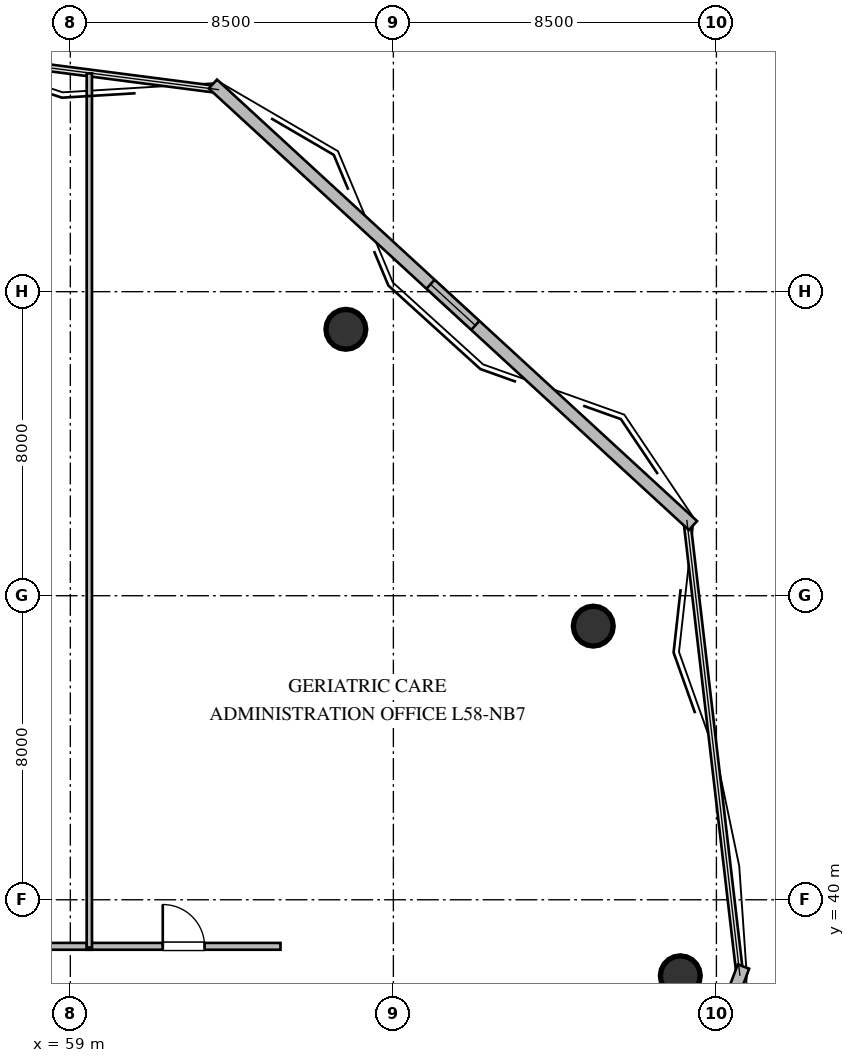
"""IFC4 building model, lengths in metres.
Left out: names, types, materials, properties, quantities, classifications, styles, units other than length and angle.
Written with IfcOpenShell. Run it as: python <this file> out.ifc"""

import sys

from ifc_helpers import new_model, si_unit, direction, frame, frame_2d, origin, origin_2d, place, context, subcontext, project, spatial, rectangle, circle, extrude, element, fill, save


model = new_model("IFC4")
c1 = context("Model", 3, precision=1e-05, world=origin(), true_north=direction((0.0, 1.0)))
c2 = subcontext(c1, "Body", "Model", "MODEL_VIEW")
j1 = project(units=[si_unit("LENGTHUNIT", "METRE"), si_unit("PLANEANGLEUNIT", "RADIAN")], contexts=[c1])
p1 = place(None, origin())
s1 = spatial("IfcSite", under=j1, at=p1, CompositionType="ELEMENT")
p2 = place(p1, origin())
s2 = spatial("IfcBuilding", under=s1, at=p2, CompositionType="ELEMENT")
p3 = place(p2, frame((0.0, 0.0, 220.8)))
s3 = spatial("IfcBuildingStorey", under=s2, at=p3, CompositionType="ELEMENT", Elevation=220.8)
for number, where, z_axis, x_axis in (
    (1, (75.05, 38.0, 0.0), (0.0, 0.0, 1.0), (1.0, 0.0, 0.0)),
    (2, (72.76, 47.2, 0.0), (0.0, 0.0, 1.0), (1.0, 0.0, 0.0)),
    (3, (66.25, 55.01, 0.0), (0.0, 0.0, 1.0), (1.0, 0.0, 0.0)),
):
    element("IfcColumn", number, at=place(p3, frame(where, z_axis=z_axis, x_axis=x_axis)), inside=s3, PredefinedType="COLUMN", context=c2, shape_type="SweptSolid", body=[
        extrude(circle(Radius=0.525, at=origin_2d()), origin(), (0.0, 0.0, 1.0), 3.6),
    ])
p4 = place(p3, frame((76.712, 38.243, 0.0), z_axis=(0.0, 0.0, 1.0), x_axis=(-0.353659523244, -0.935374225441, 0.0)))
e4 = element("IfcWall", 4, at=p4, inside=s3, PredefinedType="STANDARD", context=c2, shape_type="SweptSolid", body=[
    extrude(rectangle(XDim=14.172, YDim=0.32, at=frame_2d((7.086, 0.0))), origin(), (0.0, 0.0, 1.0), 3.36),
])
p5 = place(p3, frame((62.751, 61.463, 0.0), z_axis=(0.0, 0.0, 1.0), x_axis=(0.736063690764, -0.676912286149, 0.0)))
e5 = element("IfcWall", 5, at=p5, inside=s3, PredefinedType="STANDARD", context=c2, shape_type="SweptSolid", body=[
    extrude(rectangle(XDim=17.162, YDim=0.32, at=frame_2d((8.581, 0.0))), origin(), (0.0, 0.0, 1.0), 3.36),
])
p6 = place(p5, frame((7.781, 0.0, 1.05)))
e6 = element("IfcOpeningElement", 6, at=p6, cuts=e5, PredefinedType="OPENING", context=c2, shape_type="SweptSolid", body=[
    extrude(rectangle(XDim=1.6, YDim=1.5, at=frame_2d((0.8, 0.75))), frame((0.0, 0.17, 0.0), z_axis=(0.0, -1.0, 0.0), x_axis=(1.0, 0.0, 0.0)), (0.0, 0.0, 1.0), 0.34),
])
p7 = place(p3, frame((54.935, 38.775, 0.0), z_axis=(0.0, 0.0, 1.0), x_axis=(1.0, 0.0, 0.0)))
e7 = element("IfcWall", 7, at=p7, inside=s3, PredefinedType="PARTITIONING", context=c2, shape_type="SweptSolid", body=[
    extrude(rectangle(XDim=4.63, YDim=0.18, at=frame_2d((2.315, 0.0))), origin(), (0.0, 0.0, 1.0), 3.36),
])
p8 = place(p7, frame((1.765, 0.0, 0.0)))
e8 = element("IfcOpeningElement", 8, at=p8, cuts=e7, PredefinedType="OPENING", context=c2, shape_type="SweptSolid", body=[
    extrude(rectangle(XDim=1.1, YDim=2.1, at=frame_2d((0.55, 1.05))), frame((0.0, 0.1, 0.0), z_axis=(0.0, -1.0, 0.0), x_axis=(1.0, 0.0, 0.0)), (0.0, 0.0, 1.0), 0.2),
])
p9 = place(p3, frame((59.435, 38.775, 0.0), z_axis=(0.0, 0.0, 1.0), x_axis=(1.0, 0.0, 0.0)))
e9 = element("IfcWall", 9, at=p9, inside=s3, PredefinedType="PARTITIONING", context=c2, shape_type="SweptSolid", body=[
    extrude(rectangle(XDim=5.095, YDim=0.18, at=frame_2d((2.547, 0.0))), origin(), (0.0, 0.0, 1.0), 3.36),
])
p10 = place(p9, frame((1.997, 0.0, 0.0)))
e10 = element("IfcOpeningElement", 10, at=p10, cuts=e9, PredefinedType="OPENING", context=c2, shape_type="SweptSolid", body=[
    extrude(rectangle(XDim=1.1, YDim=2.1, at=frame_2d((0.55, 1.05))), frame((0.0, 0.1, 0.0), z_axis=(0.0, -1.0, 0.0), x_axis=(1.0, 0.0, 0.0)), (0.0, 0.0, 1.0), 0.2),
])
p11 = place(p3, frame((59.5, 61.745, 0.0), z_axis=(0.0, 0.0, 1.0), x_axis=(0.0, -1.0, 0.0)))
e11 = element("IfcWall", 11, at=p11, inside=s3, PredefinedType="PARTITIONING", context=c2, shape_type="SweptSolid", body=[
    extrude(rectangle(XDim=23.0, YDim=0.14, at=frame_2d((11.5, 0.0))), origin(), (0.0, 0.0, 1.0), 2.996),
])
p12 = place(p6, origin())
e12 = element("IfcWindow", 12, at=p12, inside=s3, PartitioningType="SINGLE_PANEL", PredefinedType="WINDOW", context=c2, shape_type="SweptSolid", body=[
    extrude(rectangle(XDim=1.6, YDim=1.5, at=frame_2d((0.8, 0.75))), frame((0.0, 0.03, 0.0), z_axis=(0.0, -1.0, 0.0), x_axis=(1.0, 0.0, 0.0)), (0.0, 0.0, 1.0), 0.06),
])
fill(e6, e12)
p13 = place(p10, origin())
e13 = element("IfcDoor", 13, at=p13, inside=s3, OperationType="SINGLE_SWING_LEFT", PredefinedType="DOOR", context=c2, shape_type="SweptSolid", body=[
    extrude(rectangle(XDim=1.1, YDim=2.1, at=frame_2d((0.55, 1.05))), frame((0.0, 0.025, 0.0), z_axis=(0.0, -1.0, 0.0), x_axis=(1.0, 0.0, 0.0)), (0.0, 0.0, 1.0), 0.05),
])
fill(e10, e13)
save(model, sys.argv[1])
